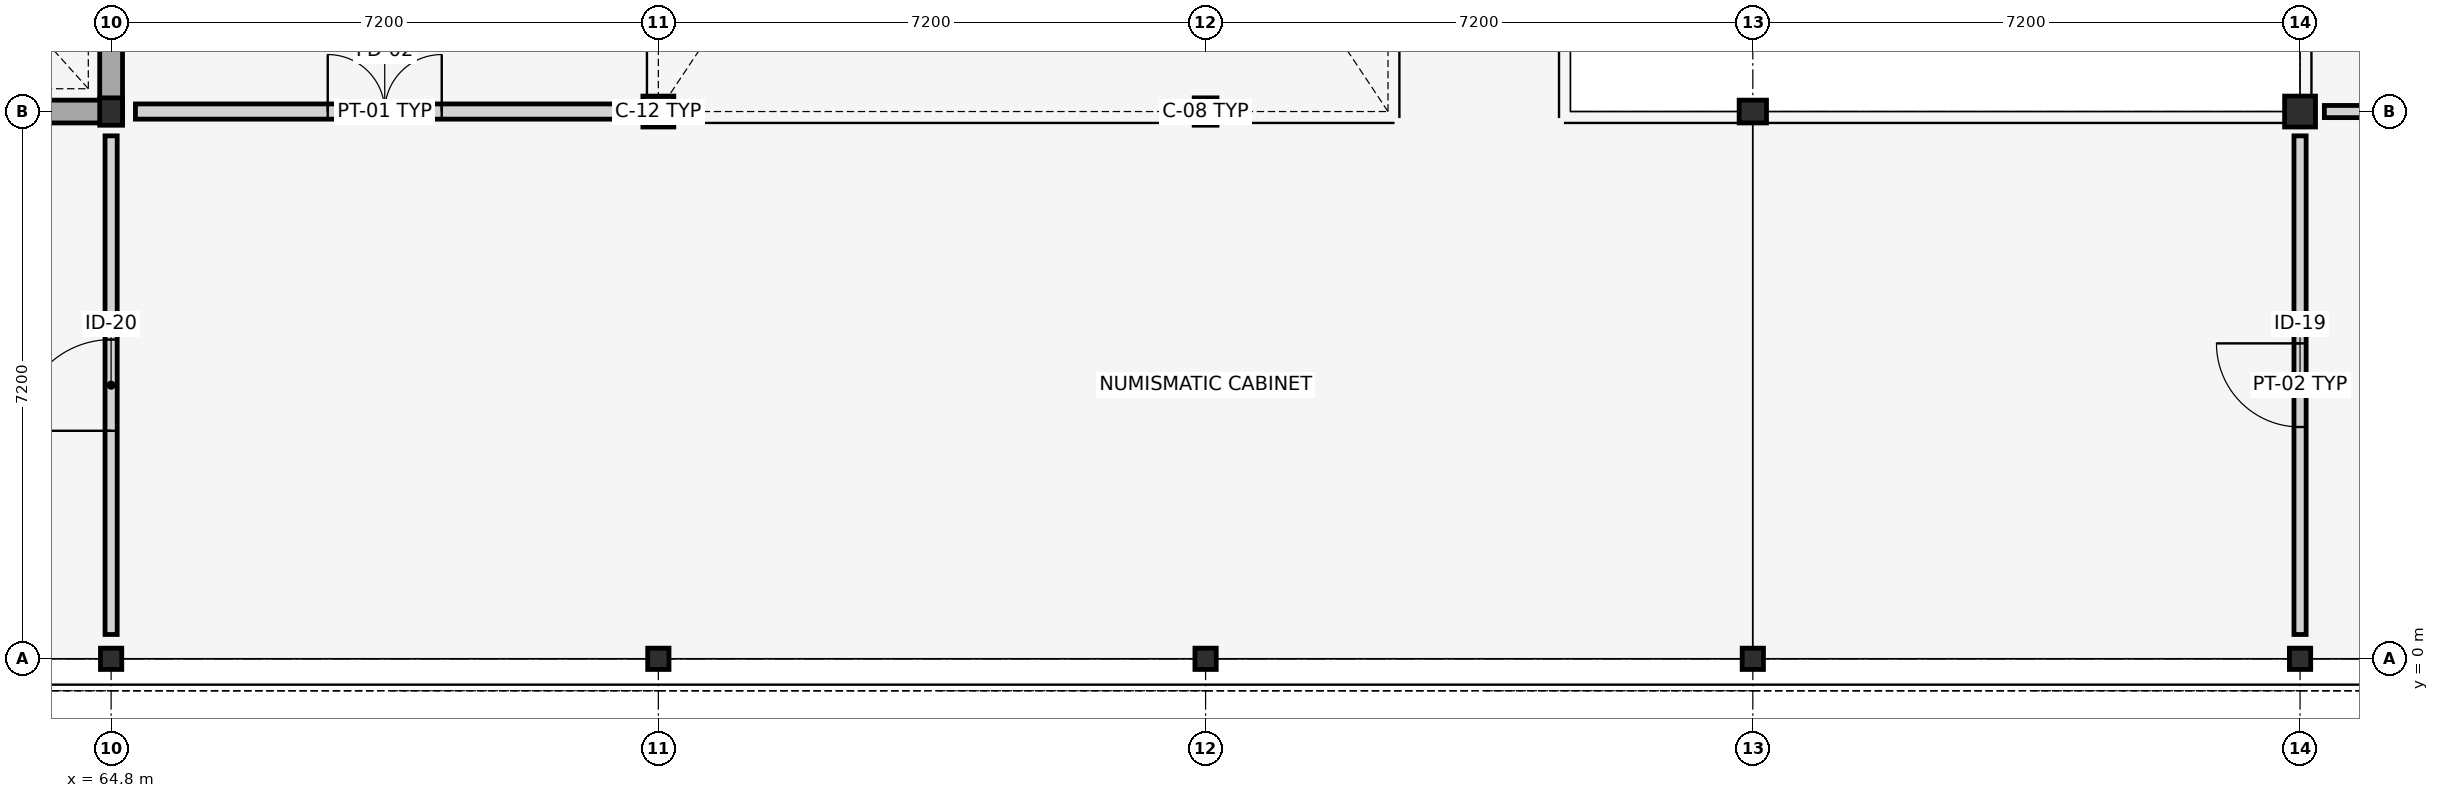
"""IFC4 building model, lengths in metres.
Left out: names, types, materials, properties, quantities, classifications, styles, units other than length and angle.
Written with IfcOpenShell. Run it as: python <this file> out.ifc"""

import sys

from ifc_helpers import new_model, si_unit, direction, frame, frame_2d, origin, origin_2d, place, context, subcontext, project, spatial, rectangle, hollow_circle, i_section, extrude, element, fill, save


model = new_model("IFC4")
c1 = context("Model", 3, precision=1e-05, world=origin(), true_north=direction((0.0, 1.0)))
c2 = subcontext(c1, "Body", "Model", "MODEL_VIEW")
j1 = project(units=[si_unit("LENGTHUNIT", "METRE"), si_unit("PLANEANGLEUNIT", "RADIAN")], contexts=[c1])
p1 = place(None, origin())
s1 = spatial("IfcSite", under=j1, at=p1, CompositionType="ELEMENT")
p2 = place(p1, origin())
s2 = spatial("IfcBuilding", under=s1, at=p2, CompositionType="ELEMENT")
p3 = place(p2, frame((0.0, 0.0, 12.9)))
s3 = spatial("IfcBuildingStorey", under=s2, at=p3, CompositionType="ELEMENT", Elevation=12.9)
p4 = place(p3, frame((64.8, 0.0, 0.0), z_axis=(0.0, 0.0, 1.0), x_axis=(0.0, 1.0, 0.0)))
e1 = element("IfcColumn", 1, at=p4, inside=s3, PredefinedType="COLUMN", context=c2, shape_type="SweptSolid", body=[
    extrude(i_section(OverallWidth=0.28, OverallDepth=0.28, WebThickness=0.01, FlangeThickness=0.018, FilletRadius=0.024, at=origin_2d()), origin(), (0.0, 0.0, 1.0), 4.2),
])
p5 = place(p3, frame((64.8, 7.2, 0.0), z_axis=(0.0, 0.0, 1.0), x_axis=(1.0, 0.0, 0.0)))
e2 = element("IfcColumn", 2, at=p5, inside=s3, PredefinedType="COLUMN", context=c2, shape_type="SweptSolid", body=[
    extrude(i_section(OverallWidth=0.3, OverallDepth=0.36, WebThickness=0.012, FlangeThickness=0.022, FilletRadius=0.027, at=origin_2d()), origin(), (0.0, 0.0, 1.0), 4.2),
])
p6 = place(p3, frame((72.0, 0.0, 0.0), z_axis=(0.0, 0.0, 1.0), x_axis=(1.0, 0.0, 0.0)))
e3 = element("IfcColumn", 3, at=p6, inside=s3, PredefinedType="COLUMN", context=c2, shape_type="SweptSolid", body=[
    extrude(i_section(OverallWidth=0.28, OverallDepth=0.28, WebThickness=0.01, FlangeThickness=0.018, FilletRadius=0.024, at=origin_2d()), origin(), (0.0, 0.0, 1.0), 4.2),
])
p7 = place(p3, frame((72.0, 7.2, 0.0), z_axis=(0.0, 0.0, 1.0), x_axis=(0.0, 1.0, 0.0)))
e4 = element("IfcColumn", 4, at=p7, inside=s3, PredefinedType="COLUMN", context=c2, shape_type="SweptSolid", body=[
    extrude(hollow_circle(Radius=0.203, WallThickness=0.016, at=origin_2d()), origin(), (0.0, 0.0, 1.0), 4.2),
])
p8 = place(p3, frame((79.2, 0.0, 0.0), z_axis=(0.0, 0.0, 1.0), x_axis=(0.0, 1.0, 0.0)))
e5 = element("IfcColumn", 5, at=p8, inside=s3, PredefinedType="COLUMN", context=c2, shape_type="SweptSolid", body=[
    extrude(i_section(OverallWidth=0.28, OverallDepth=0.28, WebThickness=0.01, FlangeThickness=0.018, FilletRadius=0.024, at=origin_2d()), origin(), (0.0, 0.0, 1.0), 4.2),
])
p9 = place(p3, frame((79.2, 7.2, 0.0), z_axis=(0.0, 0.0, 1.0), x_axis=(1.0, 0.0, 0.0)))
e6 = element("IfcColumn", 6, at=p9, inside=s3, PredefinedType="COLUMN", context=c2, shape_type="SweptSolid", body=[
    extrude(i_section(OverallWidth=0.3, OverallDepth=0.36, WebThickness=0.012, FlangeThickness=0.022, FilletRadius=0.027, at=origin_2d()), origin(), (0.0, 0.0, 1.0), 4.2),
])
p10 = place(p3, frame((86.4, 0.0, 0.0), z_axis=(0.0, 0.0, 1.0), x_axis=(1.0, 0.0, 0.0)))
e7 = element("IfcColumn", 7, at=p10, inside=s3, PredefinedType="COLUMN", context=c2, shape_type="SweptSolid", body=[
    extrude(i_section(OverallWidth=0.28, OverallDepth=0.28, WebThickness=0.01, FlangeThickness=0.018, FilletRadius=0.024, at=origin_2d()), origin(), (0.0, 0.0, 1.0), 4.2),
])
p11 = place(p3, frame((86.4, 7.2, 0.0), z_axis=(0.0, 0.0, 1.0), x_axis=(0.0, 1.0, 0.0)))
e8 = element("IfcColumn", 8, at=p11, inside=s3, PredefinedType="COLUMN", context=c2, shape_type="SweptSolid", body=[
    extrude(i_section(OverallWidth=0.3, OverallDepth=0.36, WebThickness=0.012, FlangeThickness=0.022, FilletRadius=0.027, at=origin_2d()), origin(), (0.0, 0.0, 1.0), 4.2),
])
p12 = place(p3, frame((93.6, 0.0, 0.0), z_axis=(0.0, 0.0, 1.0), x_axis=(0.0, 1.0, 0.0)))
e9 = element("IfcColumn", 9, at=p12, inside=s3, PredefinedType="COLUMN", context=c2, shape_type="SweptSolid", body=[
    extrude(i_section(OverallWidth=0.28, OverallDepth=0.28, WebThickness=0.01, FlangeThickness=0.018, FilletRadius=0.024, at=origin_2d()), origin(), (0.0, 0.0, 1.0), 4.2),
])
p13 = place(p3, frame((93.6, 7.2, 0.0), z_axis=(0.0, 0.0, 1.0), x_axis=(1.0, 0.0, 0.0)))
e10 = element("IfcColumn", 10, at=p13, inside=s3, PredefinedType="COLUMN", context=c2, shape_type="SweptSolid", body=[
    extrude(hollow_circle(Radius=0.203, WallThickness=0.016, at=origin_2d()), origin(), (0.0, 0.0, 1.0), 4.2),
])
p14 = place(p3, frame((57.6, 7.2, 0.0), z_axis=(0.0, 0.0, 1.0), x_axis=(1.0, 0.0, 0.0)))
e11 = element("IfcWall", 11, at=p14, inside=s3, PredefinedType="SHEAR", context=c2, shape_type="SweptSolid", body=[
    extrude(rectangle(XDim=7.35, YDim=0.3, at=frame_2d((3.675, 0.0))), origin(), (0.0, 0.0, 1.0), 3.96),
])
p15 = place(p3, frame((64.8, 7.35, 0.0), z_axis=(0.0, 0.0, 1.0), x_axis=(0.0, 1.0, 0.0)))
e12 = element("IfcWall", 12, at=p15, inside=s3, PredefinedType="SHEAR", context=c2, shape_type="SweptSolid", body=[
    extrude(rectangle(XDim=14.1, YDim=0.3, at=frame_2d((7.05, 0.0))), origin(), (0.0, 0.0, 1.0), 3.96),
])
p16 = place(p15, frame((3.55, 0.0, 0.0)))
e13 = element("IfcOpeningElement", 13, at=p16, cuts=e12, PredefinedType="OPENING", context=c2, shape_type="SweptSolid", body=[
    extrude(rectangle(XDim=1.3, YDim=2.2, at=frame_2d((0.65, 1.1))), frame((0.0, 0.16, 0.0), z_axis=(0.0, -1.0, 0.0), x_axis=(1.0, 0.0, 0.0)), (0.0, 0.0, 1.0), 0.32),
])
p17 = place(p15, frame((7.85, 0.0, 0.0)))
e14 = element("IfcOpeningElement", 14, at=p17, cuts=e12, PredefinedType="OPENING", context=c2, shape_type="SweptSolid", body=[
    extrude(rectangle(XDim=1.05, YDim=2.15, at=frame_2d((0.525, 1.075))), frame((0.0, 0.16, 0.0), z_axis=(0.0, -1.0, 0.0), x_axis=(1.0, 0.0, 0.0)), (0.0, 0.0, 1.0), 0.32),
])
p18 = place(p15, frame((10.55, 0.0, 0.0)))
e15 = element("IfcOpeningElement", 15, at=p18, cuts=e12, PredefinedType="OPENING", context=c2, shape_type="SweptSolid", body=[
    extrude(rectangle(XDim=1.0, YDim=2.15, at=frame_2d((0.5, 1.075))), frame((0.0, 0.16, 0.0), z_axis=(0.0, -1.0, 0.0), x_axis=(1.0, 0.0, 0.0)), (0.0, 0.0, 1.0), 0.32),
])
p19 = place(p3, frame((65.12, 7.2, 0.0), z_axis=(0.0, 0.0, 1.0), x_axis=(1.0, 0.0, 0.0)))
e16 = element("IfcWall", 16, at=p19, inside=s3, PredefinedType="PARTITIONING", context=c2, shape_type="SweptSolid", body=[
    extrude(rectangle(XDim=6.56, YDim=0.2, at=frame_2d((3.28, 0.0))), origin(), (0.0, 0.0, 1.0), 3.15),
])
p20 = place(p19, frame((2.53, 0.0, 0.0)))
e17 = element("IfcOpeningElement", 17, at=p20, cuts=e16, PredefinedType="OPENING", context=c2, shape_type="SweptSolid", body=[
    extrude(rectangle(XDim=1.5, YDim=2.25, at=frame_2d((0.75, 1.125))), frame((0.0, 0.11, 0.0), z_axis=(0.0, -1.0, 0.0), x_axis=(1.0, 0.0, 0.0)), (0.0, 0.0, 1.0), 0.22),
])
p21 = place(p3, frame((93.6, 0.32, 0.0), z_axis=(0.0, 0.0, 1.0), x_axis=(0.0, 1.0, 0.0)))
e18 = element("IfcWall", 18, at=p21, inside=s3, PredefinedType="PARTITIONING", context=c2, shape_type="SweptSolid", body=[
    extrude(rectangle(XDim=6.56, YDim=0.16, at=frame_2d((3.28, 0.0))), origin(), (0.0, 0.0, 1.0), 3.15),
])
p22 = place(p21, frame((2.73, 0.0, 0.0)))
e19 = element("IfcOpeningElement", 19, at=p22, cuts=e18, PredefinedType="OPENING", context=c2, shape_type="SweptSolid", body=[
    extrude(rectangle(XDim=1.1, YDim=2.35, at=frame_2d((0.55, 1.175))), frame((0.0, 0.09, 0.0), z_axis=(0.0, -1.0, 0.0), x_axis=(1.0, 0.0, 0.0)), (0.0, 0.0, 1.0), 0.18),
])
p23 = place(p3, frame((64.8, 0.32, 0.0), z_axis=(0.0, 0.0, 1.0), x_axis=(0.0, 1.0, 0.0)))
e20 = element("IfcWall", 20, at=p23, inside=s3, PredefinedType="PARTITIONING", context=c2, shape_type="SweptSolid", body=[
    extrude(rectangle(XDim=6.56, YDim=0.16, at=frame_2d((3.28, 0.0))), origin(), (0.0, 0.0, 1.0), 3.15),
])
p24 = place(p23, frame((2.68, 0.0, 0.0)))
e21 = element("IfcOpeningElement", 21, at=p24, cuts=e20, PredefinedType="OPENING", context=c2, shape_type="SweptSolid", body=[
    extrude(rectangle(XDim=1.2, YDim=2.4, at=frame_2d((0.6, 1.2))), frame((0.0, 0.09, 0.0), z_axis=(0.0, -1.0, 0.0), x_axis=(1.0, 0.0, 0.0)), (0.0, 0.0, 1.0), 0.18),
])
p25 = place(p3, frame((93.92, 7.2, 0.0), z_axis=(0.0, 0.0, 1.0), x_axis=(1.0, 0.0, 0.0)))
e22 = element("IfcWall", 22, at=p25, inside=s3, PredefinedType="PARTITIONING", context=c2, shape_type="SweptSolid", body=[
    extrude(rectangle(XDim=6.56, YDim=0.16, at=frame_2d((3.28, 0.0))), origin(), (0.0, 0.0, 1.0), 3.15),
])
p26 = place(p25, frame((2.455, 0.0, 0.0)))
e23 = element("IfcOpeningElement", 23, at=p26, cuts=e22, PredefinedType="OPENING", context=c2, shape_type="SweptSolid", body=[
    extrude(rectangle(XDim=1.65, YDim=2.45, at=frame_2d((0.825, 1.225))), frame((0.0, 0.09, 0.0), z_axis=(0.0, -1.0, 0.0), x_axis=(1.0, 0.0, 0.0)), (0.0, 0.0, 1.0), 0.18),
])
p27 = place(p20, origin())
e24 = element("IfcDoor", 24, at=p27, inside=s3, OperationType="DOUBLE_DOOR_SINGLE_SWING", PredefinedType="DOOR", context=c2, shape_type="SweptSolid", body=[
    extrude(rectangle(XDim=1.5, YDim=2.25, at=frame_2d((0.75, 1.125))), frame((0.0, 0.025, 0.0), z_axis=(0.0, -1.0, 0.0), x_axis=(1.0, 0.0, 0.0)), (0.0, 0.0, 1.0), 0.05),
])
fill(e17, e24)
p28 = place(p22, origin())
e25 = element("IfcDoor", 25, at=p28, inside=s3, OperationType="SINGLE_SWING_RIGHT", PredefinedType="DOOR", context=c2, shape_type="SweptSolid", body=[
    extrude(rectangle(XDim=1.1, YDim=2.35, at=frame_2d((0.55, 1.175))), frame((0.0, 0.025, 0.0), z_axis=(0.0, -1.0, 0.0), x_axis=(1.0, 0.0, 0.0)), (0.0, 0.0, 1.0), 0.05),
])
fill(e19, e25)
p29 = place(p24, origin())
e26 = element("IfcDoor", 26, at=p29, inside=s3, OperationType="SINGLE_SWING_LEFT", PredefinedType="DOOR", context=c2, shape_type="SweptSolid", body=[
    extrude(rectangle(XDim=1.2, YDim=2.4, at=frame_2d((0.6, 1.2))), frame((0.0, 0.025, 0.0), z_axis=(0.0, -1.0, 0.0), x_axis=(1.0, 0.0, 0.0)), (0.0, 0.0, 1.0), 0.05),
])
fill(e21, e26)
save(model, sys.argv[1])
